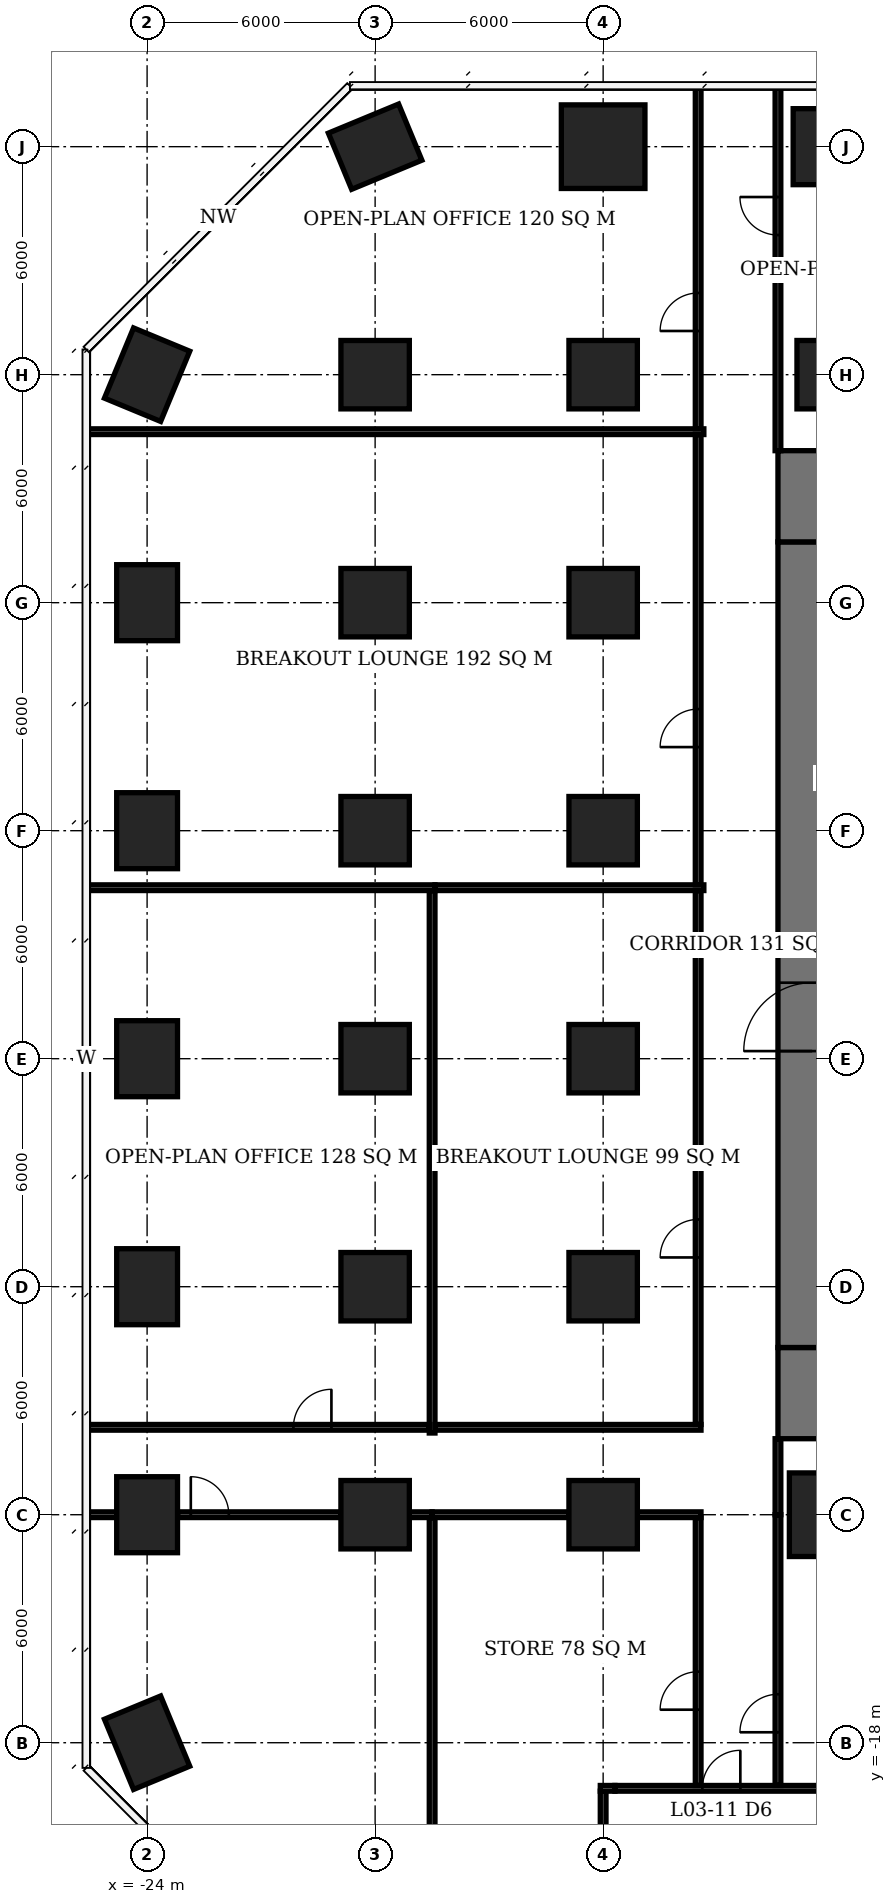
"""IFC4 building model, lengths in metres.
Left out: names, types, materials, properties, quantities, classifications, styles, units other than length and angle.
Written with IfcOpenShell. Run it as: python <this file> out.ifc"""

import sys

from ifc_helpers import new_model, si_unit, direction, frame, frame_2d, origin, origin_2d, place, context, subcontext, project, spatial, rectangle, extrude, element, fill, save


model = new_model("IFC4")
c1 = context("Model", 3, precision=1e-05, world=origin(), true_north=direction((0.0, 1.0)))
c2 = subcontext(c1, "Body", "Model", "MODEL_VIEW")
j1 = project(units=[si_unit("LENGTHUNIT", "METRE"), si_unit("PLANEANGLEUNIT", "RADIAN")], contexts=[c1])
p1 = place(None, origin())
s1 = spatial("IfcSite", under=j1, at=p1, CompositionType="ELEMENT")
p2 = place(p1, origin())
s2 = spatial("IfcBuilding", under=s1, at=p2, CompositionType="ELEMENT")
p3 = place(p2, frame((0.0, 0.0, 18.2)))
s3 = spatial("IfcBuildingStorey", under=s2, at=p3, CompositionType="ELEMENT", Elevation=18.2)
for number, where, z_axis, x_axis in (
    (1, (-24.0, -18.0, 0.0), (0.0, 0.0, 1.0), (-0.383, 0.924, 0.0)),
    (2, (-24.0, -12.0, 0.0), (0.0, 0.0, 1.0), (0.0, 1.0, 0.0)),
    (3, (-24.0, -6.0, 0.0), (0.0, 0.0, 1.0), (0.0, 1.0, 0.0)),
    (4, (-24.0, 0.0, 0.0), (0.0, 0.0, 1.0), (0.0, 1.0, 0.0)),
    (5, (-24.0, 6.0, 0.0), (0.0, 0.0, 1.0), (0.0, 1.0, 0.0)),
    (6, (-24.0, 12.0, 0.0), (0.0, 0.0, 1.0), (0.0, 1.0, 0.0)),
    (7, (-24.0, 18.0, 0.0), (0.0, 0.0, 1.0), (0.383, 0.924, 0.0)),
):
    element("IfcColumn", number, at=place(p3, frame(where, z_axis=z_axis, x_axis=x_axis)), inside=s3, PredefinedType="COLUMN", context=c2, shape_type="SweptSolid", body=[
        extrude(rectangle(XDim=2.0, YDim=1.6, at=origin_2d()), origin(), (0.0, 0.0, 1.0), 3.9),
    ])
for number, where, z_axis, x_axis in (
    (8, (-18.0, -12.0, 0.0), (0.0, 0.0, 1.0), (1.0, 0.0, 0.0)),
    (9, (-18.0, -6.0, 0.0), (0.0, 0.0, 1.0), (1.0, 0.0, 0.0)),
    (10, (-18.0, 0.0, 0.0), (0.0, 0.0, 1.0), (1.0, 0.0, 0.0)),
    (11, (-18.0, 6.0, 0.0), (0.0, 0.0, 1.0), (1.0, 0.0, 0.0)),
    (12, (-18.0, 12.0, 0.0), (0.0, 0.0, 1.0), (1.0, 0.0, 0.0)),
    (13, (-18.0, 18.0, 0.0), (0.0, 0.0, 1.0), (1.0, 0.0, 0.0)),
):
    element("IfcColumn", number, at=place(p3, frame(where, z_axis=z_axis, x_axis=x_axis)), inside=s3, PredefinedType="COLUMN", context=c2, shape_type="SweptSolid", body=[
        extrude(rectangle(XDim=1.8, YDim=1.8, at=origin_2d()), origin(), (0.0, 0.0, 1.0), 3.9),
    ])
p4 = place(p3, frame((-18.0, 24.0, 0.0), z_axis=(0.0, 0.0, 1.0), x_axis=(0.923879532511, 0.382683432365, 0.0)))
e14 = element("IfcColumn", 14, at=p4, inside=s3, PredefinedType="COLUMN", context=c2, shape_type="SweptSolid", body=[
    extrude(rectangle(XDim=2.0, YDim=1.6, at=origin_2d()), origin(), (0.0, 0.0, 1.0), 3.9),
])
for number, where, z_axis, x_axis in (
    (15, (-12.0, -12.0, 0.0), (0.0, 0.0, 1.0), (1.0, 0.0, 0.0)),
    (16, (-12.0, -6.0, 0.0), (0.0, 0.0, 1.0), (1.0, 0.0, 0.0)),
    (17, (-12.0, 0.0, 0.0), (0.0, 0.0, 1.0), (1.0, 0.0, 0.0)),
    (18, (-12.0, 6.0, 0.0), (0.0, 0.0, 1.0), (1.0, 0.0, 0.0)),
    (19, (-12.0, 12.0, 0.0), (0.0, 0.0, 1.0), (1.0, 0.0, 0.0)),
    (20, (-12.0, 18.0, 0.0), (0.0, 0.0, 1.0), (1.0, 0.0, 0.0)),
):
    element("IfcColumn", number, at=place(p3, frame(where, z_axis=z_axis, x_axis=x_axis)), inside=s3, PredefinedType="COLUMN", context=c2, shape_type="SweptSolid", body=[
        extrude(rectangle(XDim=1.8, YDim=1.8, at=origin_2d()), origin(), (0.0, 0.0, 1.0), 3.9),
    ])
for number, where, z_axis, x_axis in (
    (21, (-12.0, 24.0, 0.0), (0.0, 0.0, 1.0), (1.0, 0.0, 0.0)),
    (22, (-6.0, -12.0, 0.0), (0.0, 0.0, 1.0), (1.0, 0.0, 0.0)),
):
    element("IfcColumn", number, at=place(p3, frame(where, z_axis=z_axis, x_axis=x_axis)), inside=s3, PredefinedType="COLUMN", context=c2, shape_type="SweptSolid", body=[
        extrude(rectangle(XDim=2.2, YDim=2.2, at=origin_2d()), origin(), (0.0, 0.0, 1.0), 3.9),
    ])
p5 = place(p3, frame((-6.0, 18.0, 0.0), z_axis=(0.0, 0.0, 1.0), x_axis=(1.0, 0.0, 0.0)))
e23 = element("IfcColumn", 23, at=p5, inside=s3, PredefinedType="COLUMN", context=c2, shape_type="SweptSolid", body=[
    extrude(rectangle(XDim=1.8, YDim=1.8, at=origin_2d()), origin(), (0.0, 0.0, 1.0), 3.9),
])
p6 = place(p3, frame((-6.0, 24.0, 0.0), z_axis=(0.0, 0.0, 1.0), x_axis=(1.0, 0.0, 0.0)))
e24 = element("IfcColumn", 24, at=p6, inside=s3, PredefinedType="COLUMN", context=c2, shape_type="SweptSolid", body=[
    extrude(rectangle(XDim=2.0, YDim=2.0, at=origin_2d()), origin(), (0.0, 0.0, 1.0), 3.9),
])
p7 = place(p3, frame((-6.5, -7.6, 0.0), z_axis=(0.0, 0.0, 1.0), x_axis=(0.0, 1.0, 0.0)))
e25 = element("IfcWall", 25, at=p7, inside=s3, PredefinedType="SHEAR", context=c2, shape_type="SweptSolid", body=[
    extrude(rectangle(XDim=21.2, YDim=1.8, at=frame_2d((10.6, 0.0))), origin(), (0.0, 0.0, 1.0), 3.9),
])
p8 = place(p7, frame((7.8, 0.0, 0.0)))
e26 = element("IfcOpeningElement", 26, at=p8, cuts=e25, PredefinedType="OPENING", context=c2, shape_type="SweptSolid", body=[
    extrude(rectangle(XDim=1.8, YDim=2.4, at=frame_2d((0.9, 1.2))), frame((0.0, 0.91, 0.0), z_axis=(0.0, -1.0, 0.0), x_axis=(1.0, 0.0, 0.0)), (0.0, 0.0, 1.0), 1.82),
])
for number, where, z_axis, x_axis in (
    (27, (-6.5, -10.0, 0.0), (0.0, 0.0, 1.0), (0.0, 1.0, 0.0)),
    (28, (-6.5, 13.6, 0.0), (0.0, 0.0, 1.0), (0.0, 1.0, 0.0)),
):
    element("IfcWall", number, at=place(p3, frame(where, z_axis=z_axis, x_axis=x_axis)), inside=s3, PredefinedType="SHEAR", context=c2, shape_type="SweptSolid", body=[
        extrude(rectangle(XDim=2.4, YDim=1.8, at=frame_2d((1.2, 0.0))), origin(), (0.0, 0.0, 1.0), 3.9),
    ])
for number, where, z_axis, x_axis in (
    (29, (-24.37, -22.923, 0.0), (0.0, 0.0, 1.0), (-0.707, 0.707, 0.0)),
    (30, (-28.923, 24.37, 0.0), (0.0, 0.0, 1.0), (0.707, 0.707, 0.0)),
):
    element("IfcWall", number, at=place(p3, frame(where, z_axis=z_axis, x_axis=x_axis)), inside=s3, PredefinedType="USERDEFINED", context=c2, shape_type="SweptSolid", body=[
        extrude(rectangle(XDim=6.438, YDim=0.3, at=frame_2d((3.219, 0.0))), origin(), (0.0, 0.0, 1.0), 0.6),
    ])
p9 = place(p3, frame((-12.075, -19.2, 0.0), z_axis=(0.0, 0.0, 1.0), x_axis=(1.0, 0.0, 0.0)))
e31 = element("IfcWall", 31, at=p9, inside=s3, PredefinedType="PARTITIONING", context=c2, shape_type="SweptSolid", body=[
    extrude(rectangle(XDim=0.385, YDim=0.15, at=frame_2d((0.192, 0.0))), origin(), (0.0, 0.0, 1.0), 3.05),
])
p10 = place(p3, frame((-11.69, -19.2, 0.0), z_axis=(0.0, 0.0, 1.0), x_axis=(1.0, 0.0, 0.0)))
e32 = element("IfcWall", 32, at=p10, inside=s3, PredefinedType="PARTITIONING", context=c2, shape_type="SweptSolid", body=[
    extrude(rectangle(XDim=5.38, YDim=0.15, at=frame_2d((2.69, 0.0))), origin(), (0.0, 0.0, 1.0), 3.65),
])
p11 = place(p10, frame((2.3, 0.0, 0.0)))
e33 = element("IfcOpeningElement", 33, at=p11, cuts=e32, PredefinedType="OPENING", context=c2, shape_type="SweptSolid", body=[
    extrude(rectangle(XDim=1.0, YDim=2.1, at=frame_2d((0.5, 1.05))), frame((0.0, 0.085, 0.0), z_axis=(0.0, -1.0, 0.0), x_axis=(1.0, 0.0, 0.0)), (0.0, 0.0, 1.0), 0.17),
])
p12 = place(p3, frame((-12.0, -23.2, 0.0), z_axis=(0.0, 0.0, 1.0), x_axis=(0.0, 1.0, 0.0)))
e34 = element("IfcWall", 34, at=p12, inside=s3, PredefinedType="PARTITIONING", context=c2, shape_type="SweptSolid", body=[
    extrude(rectangle(XDim=3.925, YDim=0.15, at=frame_2d((1.962, 0.0))), origin(), (0.0, 0.0, 1.0), 3.05),
])
p13 = place(p3, frame((-25.6, -12.0, 0.0), z_axis=(0.0, 0.0, 1.0), x_axis=(1.0, 0.0, 0.0)))
e35 = element("IfcWall", 35, at=p13, inside=s3, PredefinedType="PARTITIONING", context=c2, shape_type="SweptSolid", body=[
    extrude(rectangle(XDim=0.8, YDim=0.15, at=frame_2d((0.4, 0.0))), origin(), (0.0, 0.0, 1.0), 3.65),
])
p14 = place(p3, frame((-23.2, -12.0, 0.0), z_axis=(0.0, 0.0, 1.0), x_axis=(1.0, 0.0, 0.0)))
e36 = element("IfcWall", 36, at=p14, inside=s3, PredefinedType="PARTITIONING", context=c2, shape_type="SweptSolid", body=[
    extrude(rectangle(XDim=4.3, YDim=0.15, at=frame_2d((2.15, 0.0))), origin(), (0.0, 0.0, 1.0), 3.65),
])
p15 = place(p14, frame((0.35, 0.0, 0.0)))
e37 = element("IfcOpeningElement", 37, at=p15, cuts=e36, PredefinedType="OPENING", context=c2, shape_type="SweptSolid", body=[
    extrude(rectangle(XDim=1.0, YDim=2.1, at=frame_2d((0.5, 1.05))), frame((0.0, 0.085, 0.0), z_axis=(0.0, -1.0, 0.0), x_axis=(1.0, 0.0, 0.0)), (0.0, 0.0, 1.0), 0.17),
])
p16 = place(p3, frame((-17.1, -12.0, 0.0), z_axis=(0.0, 0.0, 1.0), x_axis=(1.0, 0.0, 0.0)))
e38 = element("IfcWall", 38, at=p16, inside=s3, PredefinedType="PARTITIONING", context=c2, shape_type="SweptSolid", body=[
    extrude(rectangle(XDim=0.6, YDim=0.15, at=frame_2d((0.3, 0.0))), origin(), (0.0, 0.0, 1.0), 3.65),
])
p17 = place(p3, frame((-25.6, -9.7, 0.0), z_axis=(0.0, 0.0, 1.0), x_axis=(1.0, 0.0, 0.0)))
e39 = element("IfcWall", 39, at=p17, inside=s3, PredefinedType="PARTITIONING", context=c2, shape_type="SweptSolid", body=[
    extrude(rectangle(XDim=9.025, YDim=0.15, at=frame_2d((4.513, 0.0))), origin(), (0.0, 0.0, 1.0), 3.65),
])
p18 = place(p17, frame((5.45, 0.0, 0.0)))
e40 = element("IfcOpeningElement", 40, at=p18, cuts=e39, PredefinedType="OPENING", context=c2, shape_type="SweptSolid", body=[
    extrude(rectangle(XDim=1.0, YDim=2.1, at=frame_2d((0.5, 1.05))), frame((0.0, 0.085, 0.0), z_axis=(0.0, -1.0, 0.0), x_axis=(1.0, 0.0, 0.0)), (0.0, 0.0, 1.0), 0.17),
])
p19 = place(p3, frame((-25.6, 4.5, 0.0), z_axis=(0.0, 0.0, 1.0), x_axis=(1.0, 0.0, 0.0)))
e41 = element("IfcWall", 41, at=p19, inside=s3, PredefinedType="PARTITIONING", context=c2, shape_type="SweptSolid", body=[
    extrude(rectangle(XDim=9.175, YDim=0.15, at=frame_2d((4.587, 0.0))), origin(), (0.0, 0.0, 1.0), 3.65),
])
p20 = place(p3, frame((-25.6, 16.5, 0.0), z_axis=(0.0, 0.0, 1.0), x_axis=(1.0, 0.0, 0.0)))
e42 = element("IfcWall", 42, at=p20, inside=s3, PredefinedType="PARTITIONING", context=c2, shape_type="SweptSolid", body=[
    extrude(rectangle(XDim=16.25, YDim=0.15, at=frame_2d((8.125, 0.0))), origin(), (0.0, 0.0, 1.0), 3.65),
])
p21 = place(p3, frame((-16.5, -25.6, 0.0), z_axis=(0.0, 0.0, 1.0), x_axis=(0.0, 1.0, 0.0)))
e43 = element("IfcWall", 43, at=p21, inside=s3, PredefinedType="PARTITIONING", context=c2, shape_type="SweptSolid", body=[
    extrude(rectangle(XDim=13.525, YDim=0.15, at=frame_2d((6.763, 0.0))), origin(), (0.0, 0.0, 1.0), 3.65),
])
p22 = place(p3, frame((-16.5, -12.0, 0.0), z_axis=(0.0, 0.0, 1.0), x_axis=(1.0, 0.0, 0.0)))
e44 = element("IfcWall", 44, at=p22, inside=s3, PredefinedType="PARTITIONING", context=c2, shape_type="SweptSolid", body=[
    extrude(rectangle(XDim=3.6, YDim=0.15, at=frame_2d((1.8, 0.0))), origin(), (0.0, 0.0, 1.0), 3.65),
])
p23 = place(p3, frame((-11.1, -12.0, 0.0), z_axis=(0.0, 0.0, 1.0), x_axis=(1.0, 0.0, 0.0)))
e45 = element("IfcWall", 45, at=p23, inside=s3, PredefinedType="PARTITIONING", context=c2, shape_type="SweptSolid", body=[
    extrude(rectangle(XDim=1.675, YDim=0.15, at=frame_2d((0.837, 0.0))), origin(), (0.0, 0.0, 1.0), 3.65),
])
p24 = place(p3, frame((-16.5, -9.85, 0.0), z_axis=(0.0, 0.0, 1.0), x_axis=(0.0, 1.0, 0.0)))
e46 = element("IfcWall", 46, at=p24, inside=s3, PredefinedType="PARTITIONING", context=c2, shape_type="SweptSolid", body=[
    extrude(rectangle(XDim=14.275, YDim=0.15, at=frame_2d((7.138, 0.0))), origin(), (0.0, 0.0, 1.0), 3.65),
])
p25 = place(p3, frame((-16.425, -9.7, 0.0), z_axis=(0.0, 0.0, 1.0), x_axis=(1.0, 0.0, 0.0)))
e47 = element("IfcWall", 47, at=p25, inside=s3, PredefinedType="PARTITIONING", context=c2, shape_type="SweptSolid", body=[
    extrude(rectangle(XDim=7.0, YDim=0.15, at=frame_2d((3.5, 0.0))), origin(), (0.0, 0.0, 1.0), 3.65),
])
p26 = place(p3, frame((-16.425, 4.5, 0.0), z_axis=(0.0, 0.0, 1.0), x_axis=(1.0, 0.0, 0.0)))
e48 = element("IfcWall", 48, at=p26, inside=s3, PredefinedType="PARTITIONING", context=c2, shape_type="SweptSolid", body=[
    extrude(rectangle(XDim=7.075, YDim=0.15, at=frame_2d((3.538, 0.0))), origin(), (0.0, 0.0, 1.0), 3.65),
])
p27 = place(p3, frame((-9.5, -19.125, 0.0), z_axis=(0.0, 0.0, 1.0), x_axis=(0.0, 1.0, 0.0)))
e49 = element("IfcWall", 49, at=p27, inside=s3, PredefinedType="PARTITIONING", context=c2, shape_type="SweptSolid", body=[
    extrude(rectangle(XDim=7.05, YDim=0.15, at=frame_2d((3.525, 0.0))), origin(), (0.0, 0.0, 1.0), 3.65),
])
p28 = place(p27, frame((1.994, 0.0, 0.0)))
e50 = element("IfcOpeningElement", 50, at=p28, cuts=e49, PredefinedType="OPENING", context=c2, shape_type="SweptSolid", body=[
    extrude(rectangle(XDim=1.0, YDim=2.1, at=frame_2d((0.5, 1.05))), frame((0.0, 0.085, 0.0), z_axis=(0.0, -1.0, 0.0), x_axis=(1.0, 0.0, 0.0)), (0.0, 0.0, 1.0), 0.17),
])
p29 = place(p3, frame((-9.5, -9.625, 0.0), z_axis=(0.0, 0.0, 1.0), x_axis=(0.0, 1.0, 0.0)))
e51 = element("IfcWall", 51, at=p29, inside=s3, PredefinedType="PARTITIONING", context=c2, shape_type="SweptSolid", body=[
    extrude(rectangle(XDim=14.05, YDim=0.15, at=frame_2d((7.025, 0.0))), origin(), (0.0, 0.0, 1.0), 3.65),
])
p30 = place(p29, frame((4.395, 0.0, 0.0)))
e52 = element("IfcOpeningElement", 52, at=p30, cuts=e51, PredefinedType="OPENING", context=c2, shape_type="SweptSolid", body=[
    extrude(rectangle(XDim=1.0, YDim=2.1, at=frame_2d((0.5, 1.05))), frame((0.0, 0.085, 0.0), z_axis=(0.0, -1.0, 0.0), x_axis=(1.0, 0.0, 0.0)), (0.0, 0.0, 1.0), 0.17),
])
p31 = place(p3, frame((-9.5, 4.575, 0.0), z_axis=(0.0, 0.0, 1.0), x_axis=(0.0, 1.0, 0.0)))
e53 = element("IfcWall", 53, at=p31, inside=s3, PredefinedType="PARTITIONING", context=c2, shape_type="SweptSolid", body=[
    extrude(rectangle(XDim=11.85, YDim=0.15, at=frame_2d((5.925, 0.0))), origin(), (0.0, 0.0, 1.0), 3.65),
])
p32 = place(p31, frame((3.625, 0.0, 0.0)))
e54 = element("IfcOpeningElement", 54, at=p32, cuts=e53, PredefinedType="OPENING", context=c2, shape_type="SweptSolid", body=[
    extrude(rectangle(XDim=1.0, YDim=2.1, at=frame_2d((0.5, 1.05))), frame((0.0, 0.085, 0.0), z_axis=(0.0, -1.0, 0.0), x_axis=(1.0, 0.0, 0.0)), (0.0, 0.0, 1.0), 0.17),
])
p33 = place(p3, frame((-9.5, 16.575, 0.0), z_axis=(0.0, 0.0, 1.0), x_axis=(0.0, 1.0, 0.0)))
e55 = element("IfcWall", 55, at=p33, inside=s3, PredefinedType="PARTITIONING", context=c2, shape_type="SweptSolid", body=[
    extrude(rectangle(XDim=9.025, YDim=0.15, at=frame_2d((4.513, 0.0))), origin(), (0.0, 0.0, 1.0), 3.65),
])
p34 = place(p33, frame((2.575, 0.0, 0.0)))
e56 = element("IfcOpeningElement", 56, at=p34, cuts=e55, PredefinedType="OPENING", context=c2, shape_type="SweptSolid", body=[
    extrude(rectangle(XDim=1.0, YDim=2.1, at=frame_2d((0.5, 1.05))), frame((0.0, 0.085, 0.0), z_axis=(0.0, -1.0, 0.0), x_axis=(1.0, 0.0, 0.0)), (0.0, 0.0, 1.0), 0.17),
])
p35 = place(p3, frame((-7.4, -19.125, 0.0), z_axis=(0.0, 0.0, 1.0), x_axis=(0.0, 1.0, 0.0)))
e57 = element("IfcWall", 57, at=p35, inside=s3, PredefinedType="PARTITIONING", context=c2, shape_type="SweptSolid", body=[
    extrude(rectangle(XDim=7.125, YDim=0.15, at=frame_2d((3.562, 0.0))), origin(), (0.0, 0.0, 1.0), 3.65),
])
p36 = place(p35, frame((1.4, 0.0, 0.0)))
e58 = element("IfcOpeningElement", 58, at=p36, cuts=e57, PredefinedType="OPENING", context=c2, shape_type="SweptSolid", body=[
    extrude(rectangle(XDim=1.0, YDim=2.1, at=frame_2d((0.5, 1.05))), frame((0.0, 0.085, 0.0), z_axis=(0.0, -1.0, 0.0), x_axis=(1.0, 0.0, 0.0)), (0.0, 0.0, 1.0), 0.17),
])
p37 = place(p3, frame((-7.4, -12.0, 0.0), z_axis=(0.0, 0.0, 1.0), x_axis=(0.0, 1.0, 0.0)))
e59 = element("IfcWall", 59, at=p37, inside=s3, PredefinedType="PARTITIONING", context=c2, shape_type="SweptSolid", body=[
    extrude(rectangle(XDim=2.0, YDim=0.15, at=frame_2d((1.0, 0.0))), origin(), (0.0, 0.0, 1.0), 3.65),
])
p38 = place(p3, frame((-7.4, 16.0, 0.0), z_axis=(0.0, 0.0, 1.0), x_axis=(0.0, 1.0, 0.0)))
e60 = element("IfcWall", 60, at=p38, inside=s3, PredefinedType="PARTITIONING", context=c2, shape_type="SweptSolid", body=[
    extrude(rectangle(XDim=9.6, YDim=0.15, at=frame_2d((4.8, 0.0))), origin(), (0.0, 0.0, 1.0), 3.65),
])
p39 = place(p38, frame((5.675, 0.0, 0.0)))
e61 = element("IfcOpeningElement", 61, at=p39, cuts=e60, PredefinedType="OPENING", context=c2, shape_type="SweptSolid", body=[
    extrude(rectangle(XDim=1.0, YDim=2.1, at=frame_2d((0.5, 1.05))), frame((0.0, 0.085, 0.0), z_axis=(0.0, -1.0, 0.0), x_axis=(1.0, 0.0, 0.0)), (0.0, 0.0, 1.0), 0.17),
])
p40 = place(p8, origin())
e62 = element("IfcDoor", 62, at=p40, inside=s3, OperationType="DOUBLE_DOOR_SINGLE_SWING", PredefinedType="DOOR", context=c2, shape_type="SweptSolid", body=[
    extrude(rectangle(XDim=1.8, YDim=2.4, at=frame_2d((0.9, 1.2))), frame((0.0, 0.025, 0.0), z_axis=(0.0, -1.0, 0.0), x_axis=(1.0, 0.0, 0.0)), (0.0, 0.0, 1.0), 0.05),
])
fill(e26, e62)
p41 = place(p11, origin())
e63 = element("IfcDoor", 63, at=p41, inside=s3, OperationType="SINGLE_SWING_RIGHT", PredefinedType="DOOR", context=c2, shape_type="SweptSolid", body=[
    extrude(rectangle(XDim=1.0, YDim=2.1, at=frame_2d((0.5, 1.05))), frame((0.0, 0.025, 0.0), z_axis=(0.0, -1.0, 0.0), x_axis=(1.0, 0.0, 0.0)), (0.0, 0.0, 1.0), 0.05),
])
fill(e33, e63)
p42 = place(p28, origin())
e64 = element("IfcDoor", 64, at=p42, inside=s3, OperationType="SINGLE_SWING_LEFT", PredefinedType="DOOR", context=c2, shape_type="SweptSolid", body=[
    extrude(rectangle(XDim=1.0, YDim=2.1, at=frame_2d((0.5, 1.05))), frame((0.0, 0.025, 0.0), z_axis=(0.0, -1.0, 0.0), x_axis=(1.0, 0.0, 0.0)), (0.0, 0.0, 1.0), 0.05),
])
fill(e50, e64)
p43 = place(p15, origin())
e65 = element("IfcDoor", 65, at=p43, inside=s3, OperationType="SINGLE_SWING_LEFT", PredefinedType="DOOR", context=c2, shape_type="SweptSolid", body=[
    extrude(rectangle(XDim=1.0, YDim=2.1, at=frame_2d((0.5, 1.05))), frame((0.0, 0.025, 0.0), z_axis=(0.0, -1.0, 0.0), x_axis=(1.0, 0.0, 0.0)), (0.0, 0.0, 1.0), 0.05),
])
fill(e37, e65)
p44 = place(p18, origin())
e66 = element("IfcDoor", 66, at=p44, inside=s3, OperationType="SINGLE_SWING_RIGHT", PredefinedType="DOOR", context=c2, shape_type="SweptSolid", body=[
    extrude(rectangle(XDim=1.0, YDim=2.1, at=frame_2d((0.5, 1.05))), frame((0.0, 0.025, 0.0), z_axis=(0.0, -1.0, 0.0), x_axis=(1.0, 0.0, 0.0)), (0.0, 0.0, 1.0), 0.05),
])
fill(e40, e66)
p45 = place(p30, origin())
e67 = element("IfcDoor", 67, at=p45, inside=s3, OperationType="SINGLE_SWING_LEFT", PredefinedType="DOOR", context=c2, shape_type="SweptSolid", body=[
    extrude(rectangle(XDim=1.0, YDim=2.1, at=frame_2d((0.5, 1.05))), frame((0.0, 0.025, 0.0), z_axis=(0.0, -1.0, 0.0), x_axis=(1.0, 0.0, 0.0)), (0.0, 0.0, 1.0), 0.05),
])
fill(e52, e67)
p46 = place(p32, origin())
e68 = element("IfcDoor", 68, at=p46, inside=s3, OperationType="SINGLE_SWING_LEFT", PredefinedType="DOOR", context=c2, shape_type="SweptSolid", body=[
    extrude(rectangle(XDim=1.0, YDim=2.1, at=frame_2d((0.5, 1.05))), frame((0.0, 0.025, 0.0), z_axis=(0.0, -1.0, 0.0), x_axis=(1.0, 0.0, 0.0)), (0.0, 0.0, 1.0), 0.05),
])
fill(e54, e68)
p47 = place(p39, origin())
e69 = element("IfcDoor", 69, at=p47, inside=s3, OperationType="SINGLE_SWING_RIGHT", PredefinedType="DOOR", context=c2, shape_type="SweptSolid", body=[
    extrude(rectangle(XDim=1.0, YDim=2.1, at=frame_2d((0.5, 1.05))), frame((0.0, 0.025, 0.0), z_axis=(0.0, -1.0, 0.0), x_axis=(1.0, 0.0, 0.0)), (0.0, 0.0, 1.0), 0.05),
])
fill(e61, e69)
p48 = place(p34, origin())
e70 = element("IfcDoor", 70, at=p48, inside=s3, OperationType="SINGLE_SWING_LEFT", PredefinedType="DOOR", context=c2, shape_type="SweptSolid", body=[
    extrude(rectangle(XDim=1.0, YDim=2.1, at=frame_2d((0.5, 1.05))), frame((0.0, 0.025, 0.0), z_axis=(0.0, -1.0, 0.0), x_axis=(1.0, 0.0, 0.0)), (0.0, 0.0, 1.0), 0.05),
])
fill(e56, e70)
p49 = place(p36, origin())
e71 = element("IfcDoor", 71, at=p49, inside=s3, OperationType="SINGLE_SWING_LEFT", PredefinedType="DOOR", context=c2, shape_type="SweptSolid", body=[
    extrude(rectangle(XDim=1.0, YDim=2.1, at=frame_2d((0.5, 1.05))), frame((0.0, 0.025, 0.0), z_axis=(0.0, -1.0, 0.0), x_axis=(1.0, 0.0, 0.0)), (0.0, 0.0, 1.0), 0.05),
])
fill(e58, e71)
save(model, sys.argv[1])
